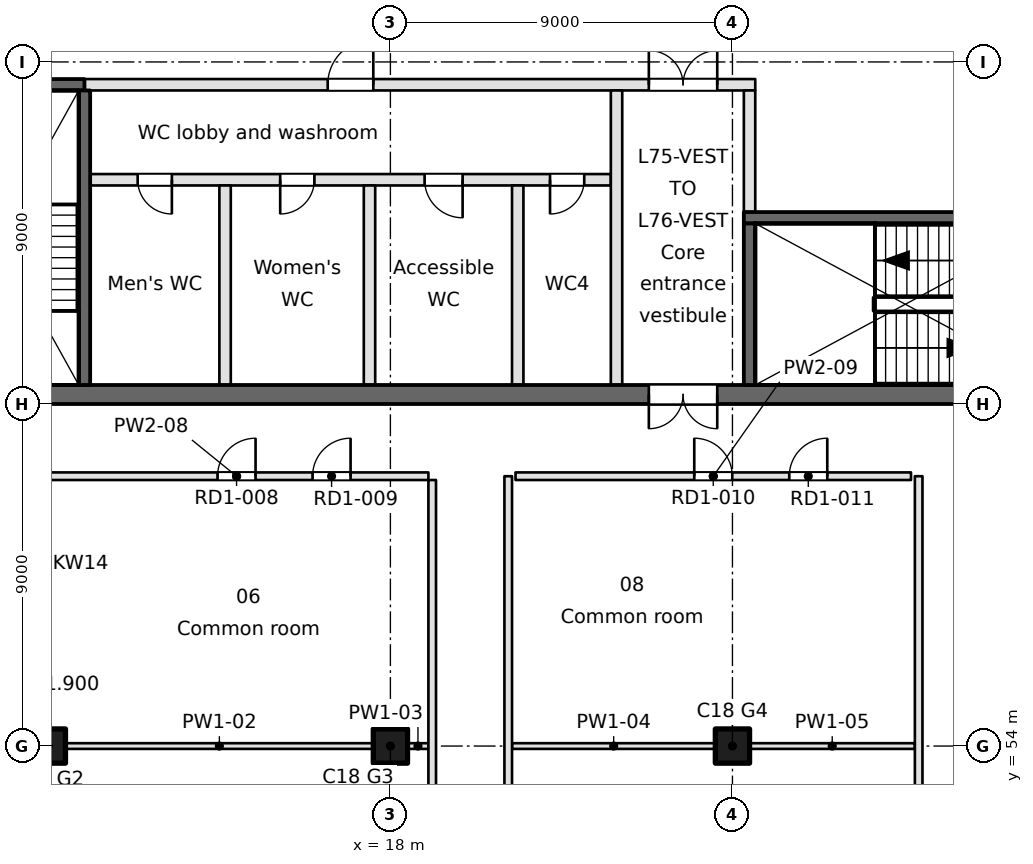
"""IFC4 building model, lengths in metres.
Left out: names, types, materials, properties, quantities, classifications, styles, units other than length and angle.
Written with IfcOpenShell. Run it as: python <this file> out.ifc"""

import sys

from ifc_helpers import new_model, si_unit, direction, frame, frame_2d, origin, origin_2d, place, context, subcontext, project, spatial, rectangle, extrude, element, fill, save


model = new_model("IFC4")
c1 = context("Model", 3, precision=1e-05, world=origin(), true_north=direction((0.0, 1.0)))
c2 = subcontext(c1, "Body", "Model", "MODEL_VIEW")
j1 = project(units=[si_unit("LENGTHUNIT", "METRE"), si_unit("PLANEANGLEUNIT", "RADIAN")], contexts=[c1])
p1 = place(None, origin())
s1 = spatial("IfcSite", under=j1, at=p1, CompositionType="ELEMENT")
p2 = place(p1, origin())
s2 = spatial("IfcBuilding", under=s1, at=p2, CompositionType="ELEMENT")
p3 = place(p2, frame((0.0, 0.0, 291.9)))
s3 = spatial("IfcBuildingStorey", under=s2, at=p3, CompositionType="ELEMENT", Elevation=291.9)
for number, where, z_axis, x_axis in (
    (1, (9.0, 54.0, 0.0), (0.0, 0.0, 1.0), (1.0, 0.0, 0.0)),
    (2, (18.0, 54.0, 0.0), (0.0, 0.0, 1.0), (1.0, 0.0, 0.0)),
    (3, (27.0, 54.0, 0.0), (0.0, 0.0, 1.0), (1.0, 0.0, 0.0)),
):
    element("IfcColumn", number, at=place(p3, frame(where, z_axis=z_axis, x_axis=x_axis)), inside=s3, PredefinedType="COLUMN", context=c2, shape_type="SweptSolid", body=[
        extrude(rectangle(XDim=0.9, YDim=0.9, at=origin_2d()), origin(), (0.0, 0.0, 1.0), 3.7),
    ])
p4 = place(p3, frame((0.9, 63.25, -0.4), z_axis=(0.0, 0.0, 1.0), x_axis=(1.0, 0.0, 0.0)))
e4 = element("IfcWall", 4, at=p4, inside=s3, PredefinedType="SOLIDWALL", context=c2, shape_type="SweptSolid", body=[
    extrude(rectangle(XDim=35.1, YDim=0.5, at=frame_2d((17.55, 0.0))), origin(), (0.0, 0.0, 1.0), 3.7),
])
p5 = place(p4, frame((23.9, 0.0, 0.4)))
e5 = element("IfcOpeningElement", 5, at=p5, cuts=e4, PredefinedType="OPENING", context=c2, shape_type="SweptSolid", body=[
    extrude(rectangle(XDim=1.8, YDim=2.1, at=frame_2d((0.9, 1.05))), frame((0.0, 0.25, 0.0), z_axis=(0.0, -1.0, 0.0), x_axis=(1.0, 0.0, 0.0)), (0.0, 0.0, 1.0), 0.5),
])
p6 = place(p4, frame((1.55, 0.0, 0.4)))
e6 = element("IfcOpeningElement", 6, at=p6, cuts=e4, PredefinedType="OPENING", context=c2, shape_type="SweptSolid", body=[
    extrude(rectangle(XDim=1.2, YDim=2.1, at=frame_2d((0.6, 1.05))), frame((0.0, 0.25, 0.0), z_axis=(0.0, -1.0, 0.0), x_axis=(1.0, 0.0, 0.0)), (0.0, 0.0, 1.0), 0.5),
])
p7 = place(p4, frame((6.15, 0.0, 0.4)))
e7 = element("IfcOpeningElement", 7, at=p7, cuts=e4, PredefinedType="OPENING", context=c2, shape_type="SweptSolid", body=[
    extrude(rectangle(XDim=1.2, YDim=2.1, at=frame_2d((0.6, 1.05))), frame((0.0, 0.25, 0.0), z_axis=(0.0, -1.0, 0.0), x_axis=(1.0, 0.0, 0.0)), (0.0, 0.0, 1.0), 0.5),
])
p8 = place(p3, frame((27.3, 67.9, -0.4), z_axis=(0.0, 0.0, 1.0), x_axis=(1.0, 0.0, 0.0)))
e8 = element("IfcWall", 8, at=p8, inside=s3, PredefinedType="SOLIDWALL", context=c2, shape_type="SweptSolid", body=[
    extrude(rectangle(XDim=8.2, YDim=0.3, at=frame_2d((4.1, 0.0))), origin(), (0.0, 0.0, 1.0), 3.7),
])
p9 = place(p3, frame((10.1, 68.9, 0.0), z_axis=(0.0, 0.0, 1.0), x_axis=(1.0, 0.0, 0.0)))
e9 = element("IfcWall", 9, at=p9, inside=s3, PredefinedType="PARTITIONING", context=c2, shape_type="SweptSolid", body=[
    extrude(rectangle(XDim=13.7, YDim=0.3, at=frame_2d((6.85, 0.0))), origin(), (0.0, 0.0, 1.0), 3.3),
])
p10 = place(p9, frame((1.25, 0.0, 0.0)))
e10 = element("IfcOpeningElement", 10, at=p10, cuts=e9, PredefinedType="OPENING", context=c2, shape_type="SweptSolid", body=[
    extrude(rectangle(XDim=0.9, YDim=2.1, at=frame_2d((0.45, 1.05))), frame((0.0, 0.15, 0.0), z_axis=(0.0, -1.0, 0.0), x_axis=(1.0, 0.0, 0.0)), (0.0, 0.0, 1.0), 0.3),
])
p11 = place(p9, frame((5.0, 0.0, 0.0)))
e11 = element("IfcOpeningElement", 11, at=p11, cuts=e9, PredefinedType="OPENING", context=c2, shape_type="SweptSolid", body=[
    extrude(rectangle(XDim=0.9, YDim=2.1, at=frame_2d((0.45, 1.05))), frame((0.0, 0.15, 0.0), z_axis=(0.0, -1.0, 0.0), x_axis=(1.0, 0.0, 0.0)), (0.0, 0.0, 1.0), 0.3),
])
p12 = place(p9, frame((8.8, 0.0, 0.0)))
e12 = element("IfcOpeningElement", 12, at=p12, cuts=e9, PredefinedType="OPENING", context=c2, shape_type="SweptSolid", body=[
    extrude(rectangle(XDim=1.0, YDim=2.1, at=frame_2d((0.5, 1.05))), frame((0.0, 0.15, 0.0), z_axis=(0.0, -1.0, 0.0), x_axis=(1.0, 0.0, 0.0)), (0.0, 0.0, 1.0), 0.3),
])
p13 = place(p9, frame((12.1, 0.0, 0.0)))
e13 = element("IfcOpeningElement", 13, at=p13, cuts=e9, PredefinedType="OPENING", context=c2, shape_type="SweptSolid", body=[
    extrude(rectangle(XDim=0.9, YDim=2.1, at=frame_2d((0.45, 1.05))), frame((0.0, 0.15, 0.0), z_axis=(0.0, -1.0, 0.0), x_axis=(1.0, 0.0, 0.0)), (0.0, 0.0, 1.0), 0.3),
])
p14 = place(p3, frame((0.9, 71.4, -0.4), z_axis=(0.0, 0.0, 1.0), x_axis=(1.0, 0.0, 0.0)))
e14 = element("IfcWall", 14, at=p14, inside=s3, PredefinedType="SOLIDWALL", context=c2, shape_type="SweptSolid", body=[
    extrude(rectangle(XDim=9.05, YDim=0.3, at=frame_2d((4.525, 0.0))), origin(), (0.0, 0.0, 1.0), 3.7),
])
p15 = place(p3, frame((9.95, 71.4, 0.0), z_axis=(0.0, 0.0, 1.0), x_axis=(1.0, 0.0, 0.0)))
e15 = element("IfcWall", 15, at=p15, inside=s3, PredefinedType="PARTITIONING", context=c2, shape_type="SweptSolid", body=[
    extrude(rectangle(XDim=17.65, YDim=0.3, at=frame_2d((8.825, 0.0))), origin(), (0.0, 0.0, 1.0), 3.3),
])
p16 = place(p15, frame((14.85, 0.0, 0.0)))
e16 = element("IfcOpeningElement", 16, at=p16, cuts=e15, PredefinedType="OPENING", context=c2, shape_type="SweptSolid", body=[
    extrude(rectangle(XDim=1.8, YDim=2.1, at=frame_2d((0.9, 1.05))), frame((0.0, 0.15, 0.0), z_axis=(0.0, -1.0, 0.0), x_axis=(1.0, 0.0, 0.0)), (0.0, 0.0, 1.0), 0.3),
])
p17 = place(p15, frame((6.4, 0.0, 0.0)))
e17 = element("IfcOpeningElement", 17, at=p17, cuts=e15, PredefinedType="OPENING", context=c2, shape_type="SweptSolid", body=[
    extrude(rectangle(XDim=1.2, YDim=2.1, at=frame_2d((0.6, 1.05))), frame((0.0, 0.15, 0.0), z_axis=(0.0, -1.0, 0.0), x_axis=(1.0, 0.0, 0.0)), (0.0, 0.0, 1.0), 0.3),
])
p18 = place(p3, frame((9.95, 63.5, -0.4), z_axis=(0.0, 0.0, 1.0), x_axis=(0.0, 1.0, 0.0)))
e18 = element("IfcWall", 18, at=p18, inside=s3, PredefinedType="SOLIDWALL", context=c2, shape_type="SweptSolid", body=[
    extrude(rectangle(XDim=7.75, YDim=0.3, at=frame_2d((3.875, 0.0))), origin(), (0.0, 0.0, 1.0), 3.7),
])
for number, where, z_axis, x_axis in (
    (19, (13.65, 63.5, 0.0), (0.0, 0.0, 1.0), (0.0, 1.0, 0.0)),
    (20, (17.45, 63.5, 0.0), (0.0, 0.0, 1.0), (0.0, 1.0, 0.0)),
    (21, (21.35, 63.5, 0.0), (0.0, 0.0, 1.0), (0.0, 1.0, 0.0)),
):
    element("IfcWall", number, at=place(p3, frame(where, z_axis=z_axis, x_axis=x_axis)), inside=s3, PredefinedType="PARTITIONING", context=c2, shape_type="SweptSolid", body=[
        extrude(rectangle(XDim=5.25, YDim=0.3, at=frame_2d((2.625, 0.0))), origin(), (0.0, 0.0, 1.0), 3.3),
    ])
p19 = place(p3, frame((23.95, 63.5, 0.0), z_axis=(0.0, 0.0, 1.0), x_axis=(0.0, 1.0, 0.0)))
e22 = element("IfcWall", 22, at=p19, inside=s3, PredefinedType="PARTITIONING", context=c2, shape_type="SweptSolid", body=[
    extrude(rectangle(XDim=7.75, YDim=0.3, at=frame_2d((3.875, 0.0))), origin(), (0.0, 0.0, 1.0), 3.3),
])
p20 = place(p3, frame((27.45, 63.5, -0.4), z_axis=(0.0, 0.0, 1.0), x_axis=(0.0, 1.0, 0.0)))
e23 = element("IfcWall", 23, at=p20, inside=s3, PredefinedType="SOLIDWALL", context=c2, shape_type="SweptSolid", body=[
    extrude(rectangle(XDim=4.25, YDim=0.3, at=frame_2d((2.125, 0.0))), origin(), (0.0, 0.0, 1.0), 3.7),
])
p21 = place(p3, frame((27.45, 68.05, 0.0), z_axis=(0.0, 0.0, 1.0), x_axis=(0.0, 1.0, 0.0)))
e24 = element("IfcWall", 24, at=p21, inside=s3, PredefinedType="PARTITIONING", context=c2, shape_type="SweptSolid", body=[
    extrude(rectangle(XDim=3.2, YDim=0.3, at=frame_2d((1.6, 0.0))), origin(), (0.0, 0.0, 1.0), 3.3),
])
p22 = place(p3, frame((9.45, 54.0, 0.0), z_axis=(0.0, 0.0, 1.0), x_axis=(1.0, 0.0, 0.0)))
e25 = element("IfcWall", 25, at=p22, inside=s3, PredefinedType="PARTITIONING", context=c2, shape_type="SweptSolid", body=[
    extrude(rectangle(XDim=8.1, YDim=0.15, at=frame_2d((4.05, 0.0))), origin(), (0.0, 0.0, 1.0), 3.3),
])
p23 = place(p3, frame((18.45, 54.0, 0.0), z_axis=(0.0, 0.0, 1.0), x_axis=(1.0, 0.0, 0.0)))
e26 = element("IfcWall", 26, at=p23, inside=s3, PredefinedType="PARTITIONING", context=c2, shape_type="SweptSolid", body=[
    extrude(rectangle(XDim=0.55, YDim=0.15, at=frame_2d((0.275, 0.0))), origin(), (0.0, 0.0, 1.0), 3.3),
])
p24 = place(p3, frame((21.2, 54.0, 0.0), z_axis=(0.0, 0.0, 1.0), x_axis=(1.0, 0.0, 0.0)))
e27 = element("IfcWall", 27, at=p24, inside=s3, PredefinedType="PARTITIONING", context=c2, shape_type="SweptSolid", body=[
    extrude(rectangle(XDim=5.35, YDim=0.15, at=frame_2d((2.675, 0.0))), origin(), (0.0, 0.0, 1.0), 3.3),
])
p25 = place(p3, frame((27.45, 54.0, 0.0), z_axis=(0.0, 0.0, 1.0), x_axis=(1.0, 0.0, 0.0)))
e28 = element("IfcWall", 28, at=p25, inside=s3, PredefinedType="PARTITIONING", context=c2, shape_type="SweptSolid", body=[
    extrude(rectangle(XDim=4.35, YDim=0.15, at=frame_2d((2.175, 0.0))), origin(), (0.0, 0.0, 1.0), 3.3),
])
p26 = place(p3, frame((19.0, 61.1, 0.0), z_axis=(0.0, 0.0, 1.0), x_axis=(-1.0, 0.0, 0.0)))
e29 = element("IfcWall", 29, at=p26, inside=s3, PredefinedType="PARTITIONING", context=c2, shape_type="SweptSolid", body=[
    extrude(rectangle(XDim=10.096, YDim=0.2, at=frame_2d((5.048, 0.0))), origin(), (0.0, 0.0, 1.0), 3.3),
])
p27 = place(p26, frame((4.548, 0.0, 0.0)))
e30 = element("IfcOpeningElement", 30, at=p27, cuts=e29, PredefinedType="OPENING", context=c2, shape_type="SweptSolid", body=[
    extrude(rectangle(XDim=1.0, YDim=2.1, at=frame_2d((0.5, 1.05))), frame((0.0, 0.1, 0.0), z_axis=(0.0, -1.0, 0.0), x_axis=(1.0, 0.0, 0.0)), (0.0, 0.0, 1.0), 0.2),
])
p28 = place(p26, frame((2.048, 0.0, 0.0)))
e31 = element("IfcOpeningElement", 31, at=p28, cuts=e29, PredefinedType="OPENING", context=c2, shape_type="SweptSolid", body=[
    extrude(rectangle(XDim=1.0, YDim=2.1, at=frame_2d((0.5, 1.05))), frame((0.0, 0.1, 0.0), z_axis=(0.0, -1.0, 0.0), x_axis=(1.0, 0.0, 0.0)), (0.0, 0.0, 1.0), 0.2),
])
p29 = place(p3, frame((31.698, 61.1, 0.0), z_axis=(0.0, 0.0, 1.0), x_axis=(-1.0, 0.0, 0.0)))
e32 = element("IfcWall", 32, at=p29, inside=s3, PredefinedType="PARTITIONING", context=c2, shape_type="SweptSolid", body=[
    extrude(rectangle(XDim=10.406, YDim=0.2, at=frame_2d((5.203, 0.0))), origin(), (0.0, 0.0, 1.0), 3.3),
])
p30 = place(p29, frame((4.703, 0.0, 0.0)))
e33 = element("IfcOpeningElement", 33, at=p30, cuts=e32, PredefinedType="OPENING", context=c2, shape_type="SweptSolid", body=[
    extrude(rectangle(XDim=1.0, YDim=2.1, at=frame_2d((0.5, 1.05))), frame((0.0, 0.1, 0.0), z_axis=(0.0, -1.0, 0.0), x_axis=(1.0, 0.0, 0.0)), (0.0, 0.0, 1.0), 0.2),
])
p31 = place(p29, frame((2.203, 0.0, 0.0)))
e34 = element("IfcOpeningElement", 34, at=p31, cuts=e32, PredefinedType="OPENING", context=c2, shape_type="SweptSolid", body=[
    extrude(rectangle(XDim=1.0, YDim=2.1, at=frame_2d((0.5, 1.05))), frame((0.0, 0.1, 0.0), z_axis=(0.0, -1.0, 0.0), x_axis=(1.0, 0.0, 0.0)), (0.0, 0.0, 1.0), 0.2),
])
p32 = place(p3, frame((19.1, 34.679, 0.0), z_axis=(0.0, 0.0, 1.0), x_axis=(0.0, 1.0, 0.0)))
e35 = element("IfcWall", 35, at=p32, inside=s3, PredefinedType="PARTITIONING", context=c2, shape_type="SweptSolid", body=[
    extrude(rectangle(XDim=26.321, YDim=0.2, at=frame_2d((13.16, 0.0))), origin(), (0.0, 0.0, 1.0), 3.3),
])
p33 = place(p32, frame((8.651, 0.0, 0.0)))
e36 = element("IfcOpeningElement", 36, at=p33, cuts=e35, PredefinedType="OPENING", context=c2, shape_type="SweptSolid", body=[
    extrude(rectangle(XDim=1.0, YDim=2.1, at=frame_2d((0.5, 1.05))), frame((0.0, 0.1, 0.0), z_axis=(0.0, -1.0, 0.0), x_axis=(1.0, 0.0, 0.0)), (0.0, 0.0, 1.0), 0.2),
])
p34 = place(p32, frame((11.151, 0.0, 0.0)))
e37 = element("IfcOpeningElement", 37, at=p34, cuts=e35, PredefinedType="OPENING", context=c2, shape_type="SweptSolid", body=[
    extrude(rectangle(XDim=1.0, YDim=2.1, at=frame_2d((0.5, 1.05))), frame((0.0, 0.1, 0.0), z_axis=(0.0, -1.0, 0.0), x_axis=(1.0, 0.0, 0.0)), (0.0, 0.0, 1.0), 0.2),
])
p35 = place(p3, frame((21.1, 61.1, 0.0), z_axis=(0.0, 0.0, 1.0), x_axis=(0.0, -1.0, 0.0)))
e38 = element("IfcWall", 38, at=p35, inside=s3, PredefinedType="PARTITIONING", context=c2, shape_type="SweptSolid", body=[
    extrude(rectangle(XDim=26.819, YDim=0.2, at=frame_2d((13.409, 0.0))), origin(), (0.0, 0.0, 1.0), 3.3),
])
p36 = place(p35, frame((16.418, 0.0, 0.0)))
e39 = element("IfcOpeningElement", 39, at=p36, cuts=e38, PredefinedType="OPENING", context=c2, shape_type="SweptSolid", body=[
    extrude(rectangle(XDim=1.0, YDim=2.1, at=frame_2d((0.5, 1.05))), frame((0.0, 0.1, 0.0), z_axis=(0.0, -1.0, 0.0), x_axis=(1.0, 0.0, 0.0)), (0.0, 0.0, 1.0), 0.2),
])
p37 = place(p35, frame((13.918, 0.0, 0.0)))
e40 = element("IfcOpeningElement", 40, at=p37, cuts=e38, PredefinedType="OPENING", context=c2, shape_type="SweptSolid", body=[
    extrude(rectangle(XDim=1.0, YDim=2.1, at=frame_2d((0.5, 1.05))), frame((0.0, 0.1, 0.0), z_axis=(0.0, -1.0, 0.0), x_axis=(1.0, 0.0, 0.0)), (0.0, 0.0, 1.0), 0.2),
])
p38 = place(p3, frame((31.9, 36.693, 0.0), z_axis=(0.0, 0.0, 1.0), x_axis=(0.0, 1.0, 0.0)))
e41 = element("IfcWall", 41, at=p38, inside=s3, PredefinedType="PARTITIONING", context=c2, shape_type="SweptSolid", body=[
    extrude(rectangle(XDim=24.407, YDim=0.2, at=frame_2d((12.204, 0.0))), origin(), (0.0, 0.0, 1.0), 3.3),
])
p39 = place(p5, frame((1.8, 0.0, 0.0), z_axis=(0.0, 0.0, 1.0), x_axis=(-1.0, 0.0, 0.0)))
e42 = element("IfcDoor", 42, at=p39, inside=s3, OperationType="DOUBLE_DOOR_SINGLE_SWING", PredefinedType="DOOR", context=c2, shape_type="SweptSolid", body=[
    extrude(rectangle(XDim=1.8, YDim=2.1, at=frame_2d((0.9, 1.05))), frame((0.0, 0.025, 0.0), z_axis=(0.0, -1.0, 0.0), x_axis=(1.0, 0.0, 0.0)), (0.0, 0.0, 1.0), 0.05),
])
fill(e5, e42)
p40 = place(p16, origin())
e43 = element("IfcDoor", 43, at=p40, inside=s3, OperationType="DOUBLE_DOOR_SINGLE_SWING", PredefinedType="DOOR", context=c2, shape_type="SweptSolid", body=[
    extrude(rectangle(XDim=1.8, YDim=2.1, at=frame_2d((0.9, 1.05))), frame((0.0, 0.025, 0.0), z_axis=(0.0, -1.0, 0.0), x_axis=(1.0, 0.0, 0.0)), (0.0, 0.0, 1.0), 0.05),
])
fill(e16, e43)
p41 = place(p10, frame((0.9, 0.0, 0.0), z_axis=(0.0, 0.0, 1.0), x_axis=(-1.0, 0.0, 0.0)))
e44 = element("IfcDoor", 44, at=p41, inside=s3, OperationType="SINGLE_SWING_LEFT", PredefinedType="DOOR", context=c2, shape_type="SweptSolid", body=[
    extrude(rectangle(XDim=0.9, YDim=2.1, at=frame_2d((0.45, 1.05))), frame((0.0, 0.025, 0.0), z_axis=(0.0, -1.0, 0.0), x_axis=(1.0, 0.0, 0.0)), (0.0, 0.0, 1.0), 0.05),
])
fill(e10, e44)
p42 = place(p11, frame((0.9, 0.0, 0.0), z_axis=(0.0, 0.0, 1.0), x_axis=(-1.0, 0.0, 0.0)))
e45 = element("IfcDoor", 45, at=p42, inside=s3, OperationType="SINGLE_SWING_RIGHT", PredefinedType="DOOR", context=c2, shape_type="SweptSolid", body=[
    extrude(rectangle(XDim=0.9, YDim=2.1, at=frame_2d((0.45, 1.05))), frame((0.0, 0.025, 0.0), z_axis=(0.0, -1.0, 0.0), x_axis=(1.0, 0.0, 0.0)), (0.0, 0.0, 1.0), 0.05),
])
fill(e11, e45)
p43 = place(p12, frame((1.0, 0.0, 0.0), z_axis=(0.0, 0.0, 1.0), x_axis=(-1.0, 0.0, 0.0)))
e46 = element("IfcDoor", 46, at=p43, inside=s3, OperationType="SINGLE_SWING_LEFT", PredefinedType="DOOR", context=c2, shape_type="SweptSolid", body=[
    extrude(rectangle(XDim=1.0, YDim=2.1, at=frame_2d((0.5, 1.05))), frame((0.0, 0.025, 0.0), z_axis=(0.0, -1.0, 0.0), x_axis=(1.0, 0.0, 0.0)), (0.0, 0.0, 1.0), 0.05),
])
fill(e12, e46)
p44 = place(p13, frame((0.9, 0.0, 0.0), z_axis=(0.0, 0.0, 1.0), x_axis=(-1.0, 0.0, 0.0)))
e47 = element("IfcDoor", 47, at=p44, inside=s3, OperationType="SINGLE_SWING_RIGHT", PredefinedType="DOOR", context=c2, shape_type="SweptSolid", body=[
    extrude(rectangle(XDim=0.9, YDim=2.1, at=frame_2d((0.45, 1.05))), frame((0.0, 0.025, 0.0), z_axis=(0.0, -1.0, 0.0), x_axis=(1.0, 0.0, 0.0)), (0.0, 0.0, 1.0), 0.05),
])
fill(e13, e47)
p45 = place(p17, origin())
e48 = element("IfcDoor", 48, at=p45, inside=s3, OperationType="SINGLE_SWING_RIGHT", PredefinedType="DOOR", context=c2, shape_type="SweptSolid", body=[
    extrude(rectangle(XDim=1.2, YDim=2.1, at=frame_2d((0.6, 1.05))), frame((0.0, 0.025, 0.0), z_axis=(0.0, -1.0, 0.0), x_axis=(1.0, 0.0, 0.0)), (0.0, 0.0, 1.0), 0.05),
])
fill(e17, e48)
p46 = place(p27, frame((1.0, 0.0, 0.0), z_axis=(0.0, 0.0, 1.0), x_axis=(-1.0, 0.0, 0.0)))
e49 = element("IfcDoor", 49, at=p46, inside=s3, OperationType="SINGLE_SWING_RIGHT", PredefinedType="DOOR", context=c2, shape_type="SweptSolid", body=[
    extrude(rectangle(XDim=1.0, YDim=2.1, at=frame_2d((0.5, 1.05))), frame((0.0, 0.025, 0.0), z_axis=(0.0, -1.0, 0.0), x_axis=(1.0, 0.0, 0.0)), (0.0, 0.0, 1.0), 0.05),
])
fill(e30, e49)
p47 = place(p28, frame((1.0, 0.0, 0.0), z_axis=(0.0, 0.0, 1.0), x_axis=(-1.0, 0.0, 0.0)))
e50 = element("IfcDoor", 50, at=p47, inside=s3, OperationType="SINGLE_SWING_RIGHT", PredefinedType="DOOR", context=c2, shape_type="SweptSolid", body=[
    extrude(rectangle(XDim=1.0, YDim=2.1, at=frame_2d((0.5, 1.05))), frame((0.0, 0.025, 0.0), z_axis=(0.0, -1.0, 0.0), x_axis=(1.0, 0.0, 0.0)), (0.0, 0.0, 1.0), 0.05),
])
fill(e31, e50)
p48 = place(p30, frame((1.0, 0.0, 0.0), z_axis=(0.0, 0.0, 1.0), x_axis=(-1.0, 0.0, 0.0)))
e51 = element("IfcDoor", 51, at=p48, inside=s3, OperationType="SINGLE_SWING_LEFT", PredefinedType="DOOR", context=c2, shape_type="SweptSolid", body=[
    extrude(rectangle(XDim=1.0, YDim=2.1, at=frame_2d((0.5, 1.05))), frame((0.0, 0.025, 0.0), z_axis=(0.0, -1.0, 0.0), x_axis=(1.0, 0.0, 0.0)), (0.0, 0.0, 1.0), 0.05),
])
fill(e33, e51)
p49 = place(p31, frame((1.0, 0.0, 0.0), z_axis=(0.0, 0.0, 1.0), x_axis=(-1.0, 0.0, 0.0)))
e52 = element("IfcDoor", 52, at=p49, inside=s3, OperationType="SINGLE_SWING_RIGHT", PredefinedType="DOOR", context=c2, shape_type="SweptSolid", body=[
    extrude(rectangle(XDim=1.0, YDim=2.1, at=frame_2d((0.5, 1.05))), frame((0.0, 0.025, 0.0), z_axis=(0.0, -1.0, 0.0), x_axis=(1.0, 0.0, 0.0)), (0.0, 0.0, 1.0), 0.05),
])
fill(e34, e52)
save(model, sys.argv[1])
